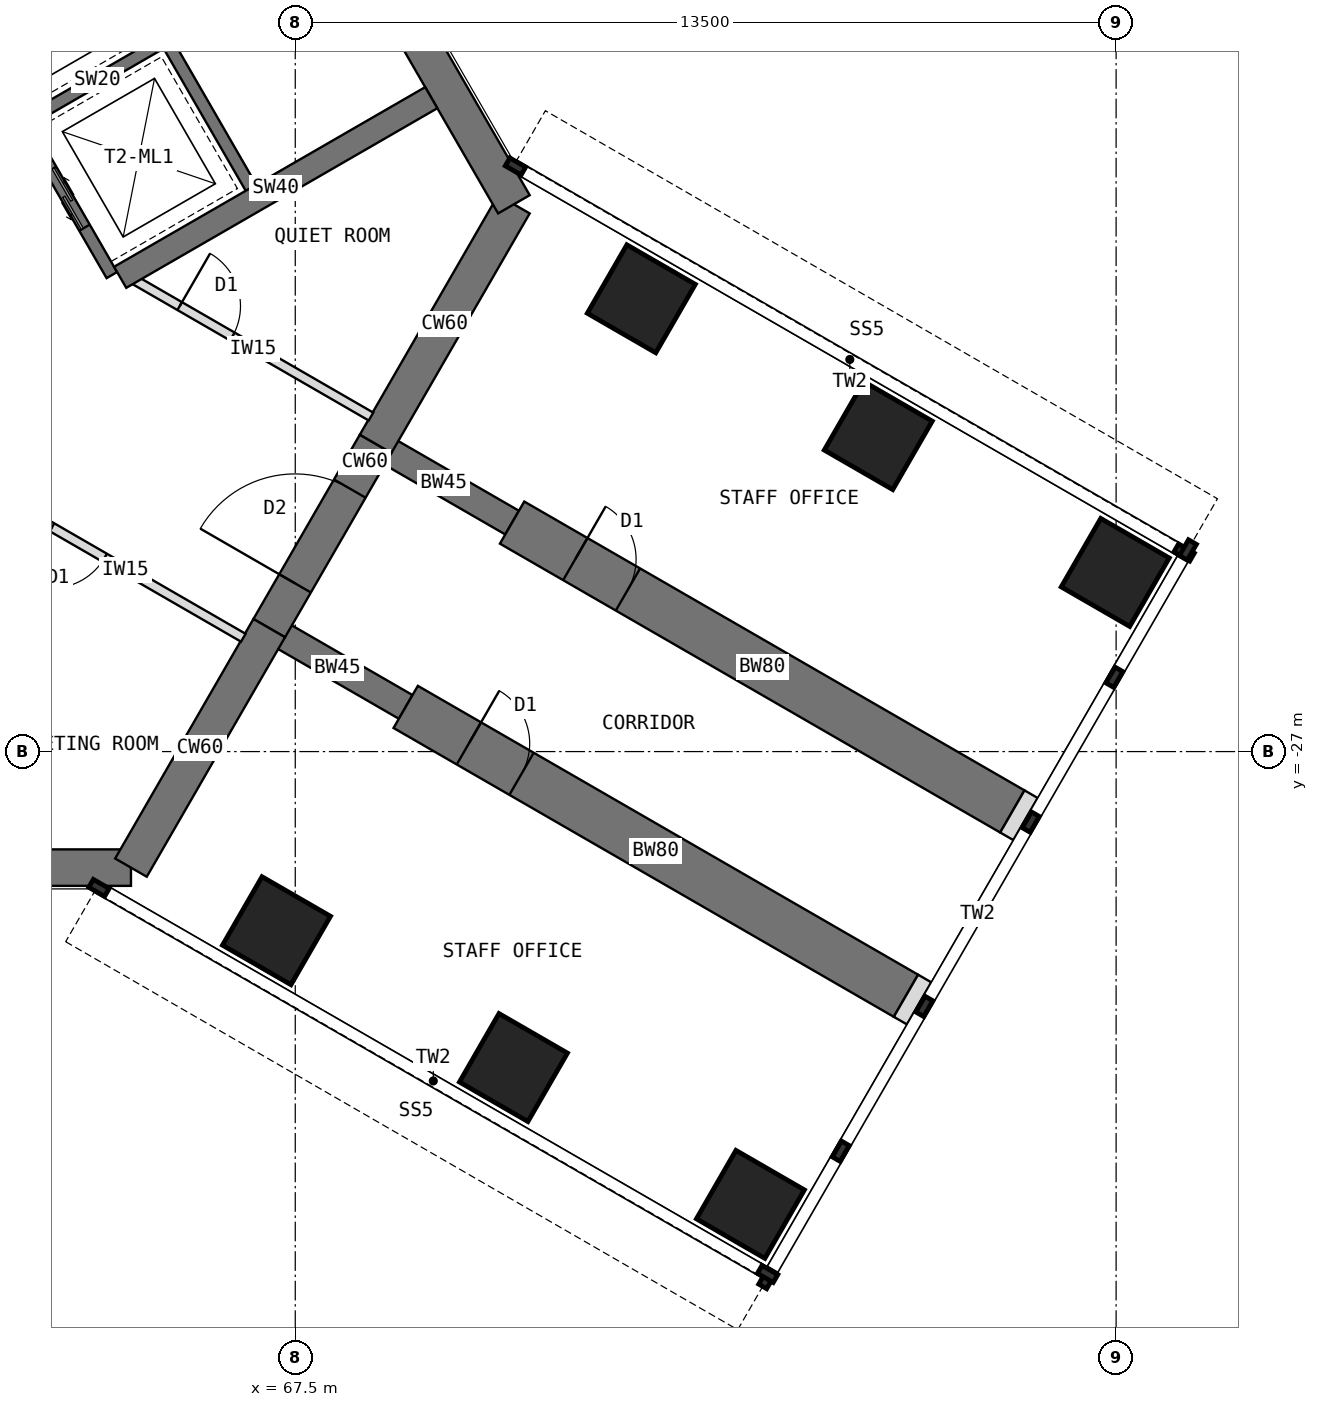
"""IFC4 building model, lengths in metres.
Left out: names, types, materials, properties, quantities, classifications, styles, units other than length and angle.
Written with IfcOpenShell. Run it as: python <this file> out.ifc"""

import sys

from ifc_helpers import new_model, si_unit, direction, frame, frame_2d, origin, origin_2d, place, context, subcontext, project, spatial, rectangle, extrude, element, fill, save


model = new_model("IFC4")
c1 = context("Model", 3, precision=1e-05, world=origin(), true_north=direction((0.0, 1.0)))
c2 = subcontext(c1, "Body", "Model", "MODEL_VIEW")
j1 = project(units=[si_unit("LENGTHUNIT", "METRE"), si_unit("PLANEANGLEUNIT", "RADIAN")], contexts=[c1])
p1 = place(None, origin())
s1 = spatial("IfcSite", under=j1, at=p1, CompositionType="ELEMENT")
p2 = place(p1, origin())
s2 = spatial("IfcBuilding", under=s1, at=p2, CompositionType="ELEMENT")
p3 = place(p2, frame((0.0, 0.0, 133.5)))
s3 = spatial("IfcBuildingStorey", under=s2, at=p3, CompositionType="ELEMENT", Elevation=133.5)
p4 = place(p3, frame((52.202, -28.908, 0.0), z_axis=(0.0, 0.0, 1.0), x_axis=(1.0, 0.0, 0.0)))
e1 = element("IfcWall", 1, at=p4, inside=s3, PredefinedType="SHEAR", context=c2, shape_type="SweptSolid", body=[
    extrude(rectangle(XDim=12.596, YDim=0.6, at=frame_2d((6.298, 0.0))), origin(), (0.0, 0.0, 1.0), 4.0),
])
p5 = place(p3, frame((64.798, -28.908, 0.0), z_axis=(0.0, 0.0, 1.0), x_axis=(0.499984222037, 0.866034513004, 0.0)))
e2 = element("IfcWall", 2, at=p5, inside=s3, PredefinedType="SHEAR", context=c2, shape_type="SweptSolid", body=[
    extrude(rectangle(XDim=4.548, YDim=0.6, at=frame_2d((2.274, 0.0))), origin(), (0.0, 0.0, 1.0), 4.0),
])
p6 = place(p3, frame((67.072, -24.97, 0.0), z_axis=(0.0, 0.0, 1.0), x_axis=(0.500010275428, 0.866019471182, 0.0)))
e3 = element("IfcWall", 3, at=p6, inside=s3, PredefinedType="SHEAR", context=c2, shape_type="SweptSolid", body=[
    extrude(rectangle(XDim=3.5, YDim=0.6, at=frame_2d((1.75, 0.0))), origin(), (0.0, 0.0, 1.0), 4.0),
])
p7 = place(p6, frame((0.85, 0.0, 0.0)))
e4 = element("IfcOpeningElement", 4, at=p7, cuts=e3, PredefinedType="OPENING", context=c2, shape_type="SweptSolid", body=[
    extrude(rectangle(XDim=1.8, YDim=2.1, at=frame_2d((0.9, 1.05))), frame((0.0, 0.31, 0.0), z_axis=(0.0, -1.0, 0.0), x_axis=(1.0, 0.0, 0.0)), (0.0, 0.0, 1.0), 0.62),
])
p8 = place(p3, frame((68.822, -21.939, 0.0), z_axis=(0.0, 0.0, 1.0), x_axis=(0.500024481964, 0.866011268655, 0.0)))
e5 = element("IfcWall", 5, at=p8, inside=s3, PredefinedType="SHEAR", context=c2, shape_type="SweptSolid", body=[
    extrude(rectangle(XDim=4.548, YDim=0.6, at=frame_2d((2.274, 0.0))), origin(), (0.0, 0.0, 1.0), 4.0),
])
p9 = place(p3, frame((71.096, -18.0, 0.0), z_axis=(0.0, 0.0, 1.0), x_axis=(-0.500005998175, 0.866021940709, 0.0)))
e6 = element("IfcWall", 6, at=p9, inside=s3, PredefinedType="SHEAR", context=c2, shape_type="SweptSolid", body=[
    extrude(rectangle(XDim=12.596, YDim=0.6, at=frame_2d((6.298, 0.0))), origin(), (0.0, 0.0, 1.0), 4.0),
])
p10 = place(p3, frame((68.822, -21.939, 0.0), z_axis=(0.0, 0.0, 1.0), x_axis=(0.866072649678, -0.499918158782, 0.0)))
e7 = element("IfcWall", 7, at=p10, inside=s3, PredefinedType="SHEAR", context=c2, shape_type="SweptSolid", body=[
    extrude(rectangle(XDim=2.592, YDim=0.45, at=frame_2d((1.296, 0.0))), origin(), (0.0, 0.0, 1.0), 4.0),
])
p11 = place(p3, frame((71.066, -23.234, 0.0), z_axis=(0.0, 0.0, 1.0), x_axis=(0.86602681393, -0.499997557548, 0.0)))
e8 = element("IfcWall", 8, at=p11, inside=s3, PredefinedType="SHEAR", context=c2, shape_type="SweptSolid", body=[
    extrude(rectangle(XDim=9.5, YDim=0.8, at=frame_2d((4.75, 0.0))), origin(), (0.0, 0.0, 1.0), 4.0),
])
p12 = place(p11, frame((1.2, 0.0, 0.0)))
e9 = element("IfcOpeningElement", 9, at=p12, cuts=e8, PredefinedType="OPENING", context=c2, shape_type="SweptSolid", body=[
    extrude(rectangle(XDim=1.0, YDim=2.1, at=frame_2d((0.5, 1.05))), frame((0.0, 0.41, 0.0), z_axis=(0.0, -1.0, 0.0), x_axis=(1.0, 0.0, 0.0)), (0.0, 0.0, 1.0), 0.82),
])
p13 = place(p3, frame((67.072, -24.97, 0.0), z_axis=(0.0, 0.0, 1.0), x_axis=(0.866031863473, -0.499988811324, 0.0)))
e10 = element("IfcWall", 10, at=p13, inside=s3, PredefinedType="SHEAR", context=c2, shape_type="SweptSolid", body=[
    extrude(rectangle(XDim=2.592, YDim=0.45, at=frame_2d((1.296, 0.0))), origin(), (0.0, 0.0, 1.0), 4.0),
])
p14 = place(p3, frame((69.316, -26.266, 0.0), z_axis=(0.0, 0.0, 1.0), x_axis=(0.86602681393, -0.499997557548, 0.0)))
e11 = element("IfcWall", 11, at=p14, inside=s3, PredefinedType="SHEAR", context=c2, shape_type="SweptSolid", body=[
    extrude(rectangle(XDim=9.5, YDim=0.8, at=frame_2d((4.75, 0.0))), origin(), (0.0, 0.0, 1.0), 4.0),
])
p15 = place(p14, frame((1.2, 0.0, 0.0)))
e12 = element("IfcOpeningElement", 12, at=p15, cuts=e11, PredefinedType="OPENING", context=c2, shape_type="SweptSolid", body=[
    extrude(rectangle(XDim=1.0, YDim=2.1, at=frame_2d((0.5, 1.05))), frame((0.0, 0.41, 0.0), z_axis=(0.0, -1.0, 0.0), x_axis=(1.0, 0.0, 0.0)), (0.0, 0.0, 1.0), 0.82),
])
for number, where, z_axis, x_axis in (
    (13, (73.191, -19.554, 0.0), (0.0, 0.0, 1.0), (0.5, 0.866, 0.0)),
    (14, (67.191, -29.946, 0.0), (0.0, 0.0, 1.0), (0.5, 0.866, 0.0)),
    (15, (77.088, -21.804, 0.0), (0.0, 0.0, 1.0), (0.5, 0.866, 0.0)),
    (16, (71.088, -32.196, 0.0), (0.0, 0.0, 1.0), (0.5, 0.866, 0.0)),
    (17, (80.986, -24.054, 0.0), (0.0, 0.0, 1.0), (0.5, 0.866, 0.0)),
    (18, (74.986, -34.446, 0.0), (0.0, 0.0, 1.0), (0.5, 0.866, 0.0)),
):
    element("IfcColumn", number, at=place(p3, frame(where, z_axis=z_axis, x_axis=x_axis)), inside=s3, PredefinedType="COLUMN", context=c2, shape_type="SweptSolid", body=[
        extrude(rectangle(XDim=1.3, YDim=1.3, at=origin_2d()), origin(), (0.0, 0.0, 1.0), 4.0),
    ])
for number, where, z_axis, x_axis in (
    (19, (79.294, -27.984, 0.0), (0.0, 0.0, 1.0), (0.866, -0.5, 0.0)),
    (20, (77.544, -31.016, 0.0), (0.0, 0.0, 1.0), (0.866, -0.5, 0.0)),
):
    element("IfcWall", number, at=place(p3, frame(where, z_axis=z_axis, x_axis=x_axis)), inside=s3, PredefinedType="PARTITIONING", context=c2, shape_type="SweptSolid", body=[
        extrude(rectangle(XDim=0.25, YDim=0.8, at=frame_2d((0.125, 0.0))), origin(), (0.0, 0.0, 1.0), 3.8),
    ])
p16 = place(p3, frame((64.484, -19.164, 0.0), z_axis=(0.0, 0.0, 1.0), x_axis=(-0.49999894854, 0.866026010844, 0.0)))
e21 = element("IfcWall", 21, at=p16, inside=s3, PredefinedType="SHEAR", context=c2, shape_type="SweptSolid", body=[
    extrude(rectangle(XDim=8.0, YDim=0.2, at=frame_2d((4.0, 0.0))), origin(), (0.0, 0.0, 1.0), 4.0),
])
p17 = place(p16, frame((6.3, 0.0, 0.0)))
e22 = element("IfcOpeningElement", 22, at=p17, cuts=e21, PredefinedType="OPENING", context=c2, shape_type="SweptSolid", body=[
    extrude(rectangle(XDim=1.2, YDim=2.1, at=frame_2d((0.6, 1.05))), frame((0.0, 0.11, 0.0), z_axis=(0.0, -1.0, 0.0), x_axis=(1.0, 0.0, 0.0)), (0.0, 0.0, 1.0), 0.22),
])
p18 = place(p16, frame((0.9, 0.0, 0.0)))
e23 = element("IfcOpeningElement", 23, at=p18, cuts=e21, PredefinedType="OPENING", context=c2, shape_type="SweptSolid", body=[
    extrude(rectangle(XDim=1.1, YDim=2.2, at=frame_2d((0.55, 1.1))), frame((0.0, 0.11, 0.0), z_axis=(0.0, -1.0, 0.0), x_axis=(1.0, 0.0, 0.0)), (0.0, 0.0, 1.0), 0.22),
])
p19 = place(p16, frame((3.8, 0.0, 0.0)))
e24 = element("IfcOpeningElement", 24, at=p19, cuts=e21, PredefinedType="OPENING", context=c2, shape_type="SweptSolid", body=[
    extrude(rectangle(XDim=1.1, YDim=2.2, at=frame_2d((0.55, 1.1))), frame((0.0, 0.11, 0.0), z_axis=(0.0, -1.0, 0.0), x_axis=(1.0, 0.0, 0.0)), (0.0, 0.0, 1.0), 0.22),
])
p20 = place(p3, frame((63.12, -16.603, 0.0), z_axis=(0.0, 0.0, 1.0), x_axis=(0.866062058628, 0.499936506574, 0.0)))
e25 = element("IfcWall", 25, at=p20, inside=s3, PredefinedType="SHEAR", context=c2, shape_type="SweptSolid", body=[
    extrude(rectangle(XDim=2.6, YDim=0.2, at=frame_2d((1.3, 0.0))), origin(), (0.0, 0.0, 1.0), 4.0),
])
p21 = place(p3, frame((66.822, -17.814, 0.0), z_axis=(0.0, 0.0, 1.0), x_axis=(-0.49999894854, 0.866026010844, 0.0)))
e26 = element("IfcWall", 26, at=p21, inside=s3, PredefinedType="SHEAR", context=c2, shape_type="SweptSolid", body=[
    extrude(rectangle(XDim=8.0, YDim=0.2, at=frame_2d((4.0, 0.0))), origin(), (0.0, 0.0, 1.0), 4.0),
])
p22 = place(p21, frame((6.7, 0.0, 0.0)))
e27 = element("IfcOpeningElement", 27, at=p22, cuts=e26, PredefinedType="OPENING", context=c2, shape_type="SweptSolid", body=[
    extrude(rectangle(XDim=1.1, YDim=2.1, at=frame_2d((0.55, 1.05))), frame((0.0, 0.11, 0.0), z_axis=(0.0, -1.0, 0.0), x_axis=(1.0, 0.0, 0.0)), (0.0, 0.0, 1.0), 0.22),
])
p23 = place(p3, frame((64.62, -19.201, 0.0), z_axis=(0.0, 0.0, 1.0), x_axis=(0.866027317282, 0.49999668571, 0.0)))
e28 = element("IfcWall", 28, at=p23, inside=s3, PredefinedType="SHEAR", context=c2, shape_type="SweptSolid", body=[
    extrude(rectangle(XDim=5.908, YDim=0.4, at=frame_2d((2.954, 0.0))), origin(), (0.0, 0.0, 1.0), 4.0),
])
p24 = place(p3, frame((64.87, -19.253, 0.0), z_axis=(0.0, 0.0, 1.0), x_axis=(0.866025707867, -0.499999473313, 0.0)))
e29 = element("IfcWall", 29, at=p24, inside=s3, PredefinedType="PARTITIONING", context=c2, shape_type="SweptSolid", body=[
    extrude(rectangle(XDim=4.476, YDim=0.15, at=frame_2d((2.238, 0.0))), origin(), (0.0, 0.0, 1.0), 3.8),
])
p25 = place(p24, frame((0.843, 0.0, 0.0)))
e30 = element("IfcOpeningElement", 30, at=p25, cuts=e29, PredefinedType="OPENING", context=c2, shape_type="SweptSolid", body=[
    extrude(rectangle(XDim=1.0, YDim=2.1, at=frame_2d((0.5, 1.05))), frame((0.0, 0.085, 0.0), z_axis=(0.0, -1.0, 0.0), x_axis=(1.0, 0.0, 0.0)), (0.0, 0.0, 1.0), 0.17),
])
p26 = place(p3, frame((66.646, -25.128, 0.0), z_axis=(0.0, 0.0, 1.0), x_axis=(-0.866025707867, 0.499999473313, 0.0)))
e31 = element("IfcWall", 31, at=p26, inside=s3, PredefinedType="PARTITIONING", context=c2, shape_type="SweptSolid", body=[
    extrude(rectangle(XDim=4.476, YDim=0.15, at=frame_2d((2.238, 0.0))), origin(), (0.0, 0.0, 1.0), 3.8),
])
p27 = place(p26, frame((2.633, 0.0, 0.0)))
e32 = element("IfcOpeningElement", 32, at=p27, cuts=e31, PredefinedType="OPENING", context=c2, shape_type="SweptSolid", body=[
    extrude(rectangle(XDim=1.0, YDim=2.1, at=frame_2d((0.5, 1.05))), frame((0.0, 0.085, 0.0), z_axis=(0.0, -1.0, 0.0), x_axis=(1.0, 0.0, 0.0)), (0.0, 0.0, 1.0), 0.17),
])
p28 = place(p18, origin())
e33 = element("IfcDoor", 33, at=p28, inside=s3, OperationType="DOUBLE_DOOR_SLIDING", PredefinedType="DOOR", context=c2, shape_type="SweptSolid", body=[
    extrude(rectangle(XDim=1.1, YDim=2.2, at=frame_2d((0.55, 1.1))), frame((0.0, 0.025, 0.0), z_axis=(0.0, -1.0, 0.0), x_axis=(1.0, 0.0, 0.0)), (0.0, 0.0, 1.0), 0.05),
])
fill(e23, e33)
p29 = place(p7, origin())
e34 = element("IfcDoor", 34, at=p29, inside=s3, OperationType="DOUBLE_DOOR_DOUBLE_SWING", PredefinedType="DOOR", context=c2, shape_type="SweptSolid", body=[
    extrude(rectangle(XDim=1.72, YDim=2.06, at=frame_2d((0.9, 1.03))), frame((0.0, 0.025, 0.0), z_axis=(0.0, -1.0, 0.0), x_axis=(1.0, 0.0, 0.0)), (0.0, 0.0, 1.0), 0.05),
    extrude(rectangle(XDim=0.04, YDim=2.1, at=frame_2d((0.02, 1.05))), frame((0.0, 0.3, 0.0), z_axis=(0.0, -1.0, 0.0), x_axis=(1.0, 0.0, 0.0)), (0.0, 0.0, 1.0), 0.6),
    extrude(rectangle(XDim=0.04, YDim=2.1, at=frame_2d((1.78, 1.05))), frame((0.0, 0.3, 0.0), z_axis=(0.0, -1.0, 0.0), x_axis=(1.0, 0.0, 0.0)), (0.0, 0.0, 1.0), 0.6),
    extrude(rectangle(XDim=1.72, YDim=0.04, at=frame_2d((0.9, 2.08))), frame((0.0, 0.3, 0.0), z_axis=(0.0, -1.0, 0.0), x_axis=(1.0, 0.0, 0.0)), (0.0, 0.0, 1.0), 0.6),
])
fill(e4, e34)
p30 = place(p27, origin())
e35 = element("IfcDoor", 35, at=p30, inside=s3, OperationType="SINGLE_SWING_RIGHT", PredefinedType="DOOR", context=c2, shape_type="SweptSolid", body=[
    extrude(rectangle(XDim=1.0, YDim=2.1, at=frame_2d((0.5, 1.05))), frame((0.0, 0.025, 0.0), z_axis=(0.0, -1.0, 0.0), x_axis=(1.0, 0.0, 0.0)), (0.0, 0.0, 1.0), 0.05),
])
fill(e32, e35)
p31 = place(p25, origin())
e36 = element("IfcDoor", 36, at=p31, inside=s3, OperationType="SINGLE_SWING_LEFT", PredefinedType="DOOR", context=c2, shape_type="SweptSolid", body=[
    extrude(rectangle(XDim=1.0, YDim=2.1, at=frame_2d((0.5, 1.05))), frame((0.0, 0.025, 0.0), z_axis=(0.0, -1.0, 0.0), x_axis=(1.0, 0.0, 0.0)), (0.0, 0.0, 1.0), 0.05),
])
fill(e30, e36)
p32 = place(p12, origin())
e37 = element("IfcDoor", 37, at=p32, inside=s3, OperationType="SINGLE_SWING_LEFT", PredefinedType="DOOR", context=c2, shape_type="SweptSolid", body=[
    extrude(rectangle(XDim=0.92, YDim=2.06, at=frame_2d((0.5, 1.03))), frame((0.0, 0.025, 0.0), z_axis=(0.0, -1.0, 0.0), x_axis=(1.0, 0.0, 0.0)), (0.0, 0.0, 1.0), 0.05),
    extrude(rectangle(XDim=0.04, YDim=2.1, at=frame_2d((0.02, 1.05))), frame((0.0, 0.4, 0.0), z_axis=(0.0, -1.0, 0.0), x_axis=(1.0, 0.0, 0.0)), (0.0, 0.0, 1.0), 0.8),
    extrude(rectangle(XDim=0.04, YDim=2.1, at=frame_2d((0.98, 1.05))), frame((0.0, 0.4, 0.0), z_axis=(0.0, -1.0, 0.0), x_axis=(1.0, 0.0, 0.0)), (0.0, 0.0, 1.0), 0.8),
    extrude(rectangle(XDim=0.92, YDim=0.04, at=frame_2d((0.5, 2.08))), frame((0.0, 0.4, 0.0), z_axis=(0.0, -1.0, 0.0), x_axis=(1.0, 0.0, 0.0)), (0.0, 0.0, 1.0), 0.8),
])
fill(e9, e37)
p33 = place(p15, origin())
e38 = element("IfcDoor", 38, at=p33, inside=s3, OperationType="SINGLE_SWING_LEFT", PredefinedType="DOOR", context=c2, shape_type="SweptSolid", body=[
    extrude(rectangle(XDim=0.92, YDim=2.06, at=frame_2d((0.5, 1.03))), frame((0.0, 0.025, 0.0), z_axis=(0.0, -1.0, 0.0), x_axis=(1.0, 0.0, 0.0)), (0.0, 0.0, 1.0), 0.05),
    extrude(rectangle(XDim=0.04, YDim=2.1, at=frame_2d((0.02, 1.05))), frame((0.0, 0.4, 0.0), z_axis=(0.0, -1.0, 0.0), x_axis=(1.0, 0.0, 0.0)), (0.0, 0.0, 1.0), 0.8),
    extrude(rectangle(XDim=0.04, YDim=2.1, at=frame_2d((0.98, 1.05))), frame((0.0, 0.4, 0.0), z_axis=(0.0, -1.0, 0.0), x_axis=(1.0, 0.0, 0.0)), (0.0, 0.0, 1.0), 0.8),
    extrude(rectangle(XDim=0.92, YDim=0.04, at=frame_2d((0.5, 2.08))), frame((0.0, 0.4, 0.0), z_axis=(0.0, -1.0, 0.0), x_axis=(1.0, 0.0, 0.0)), (0.0, 0.0, 1.0), 0.8),
])
fill(e12, e38)
save(model, sys.argv[1])
